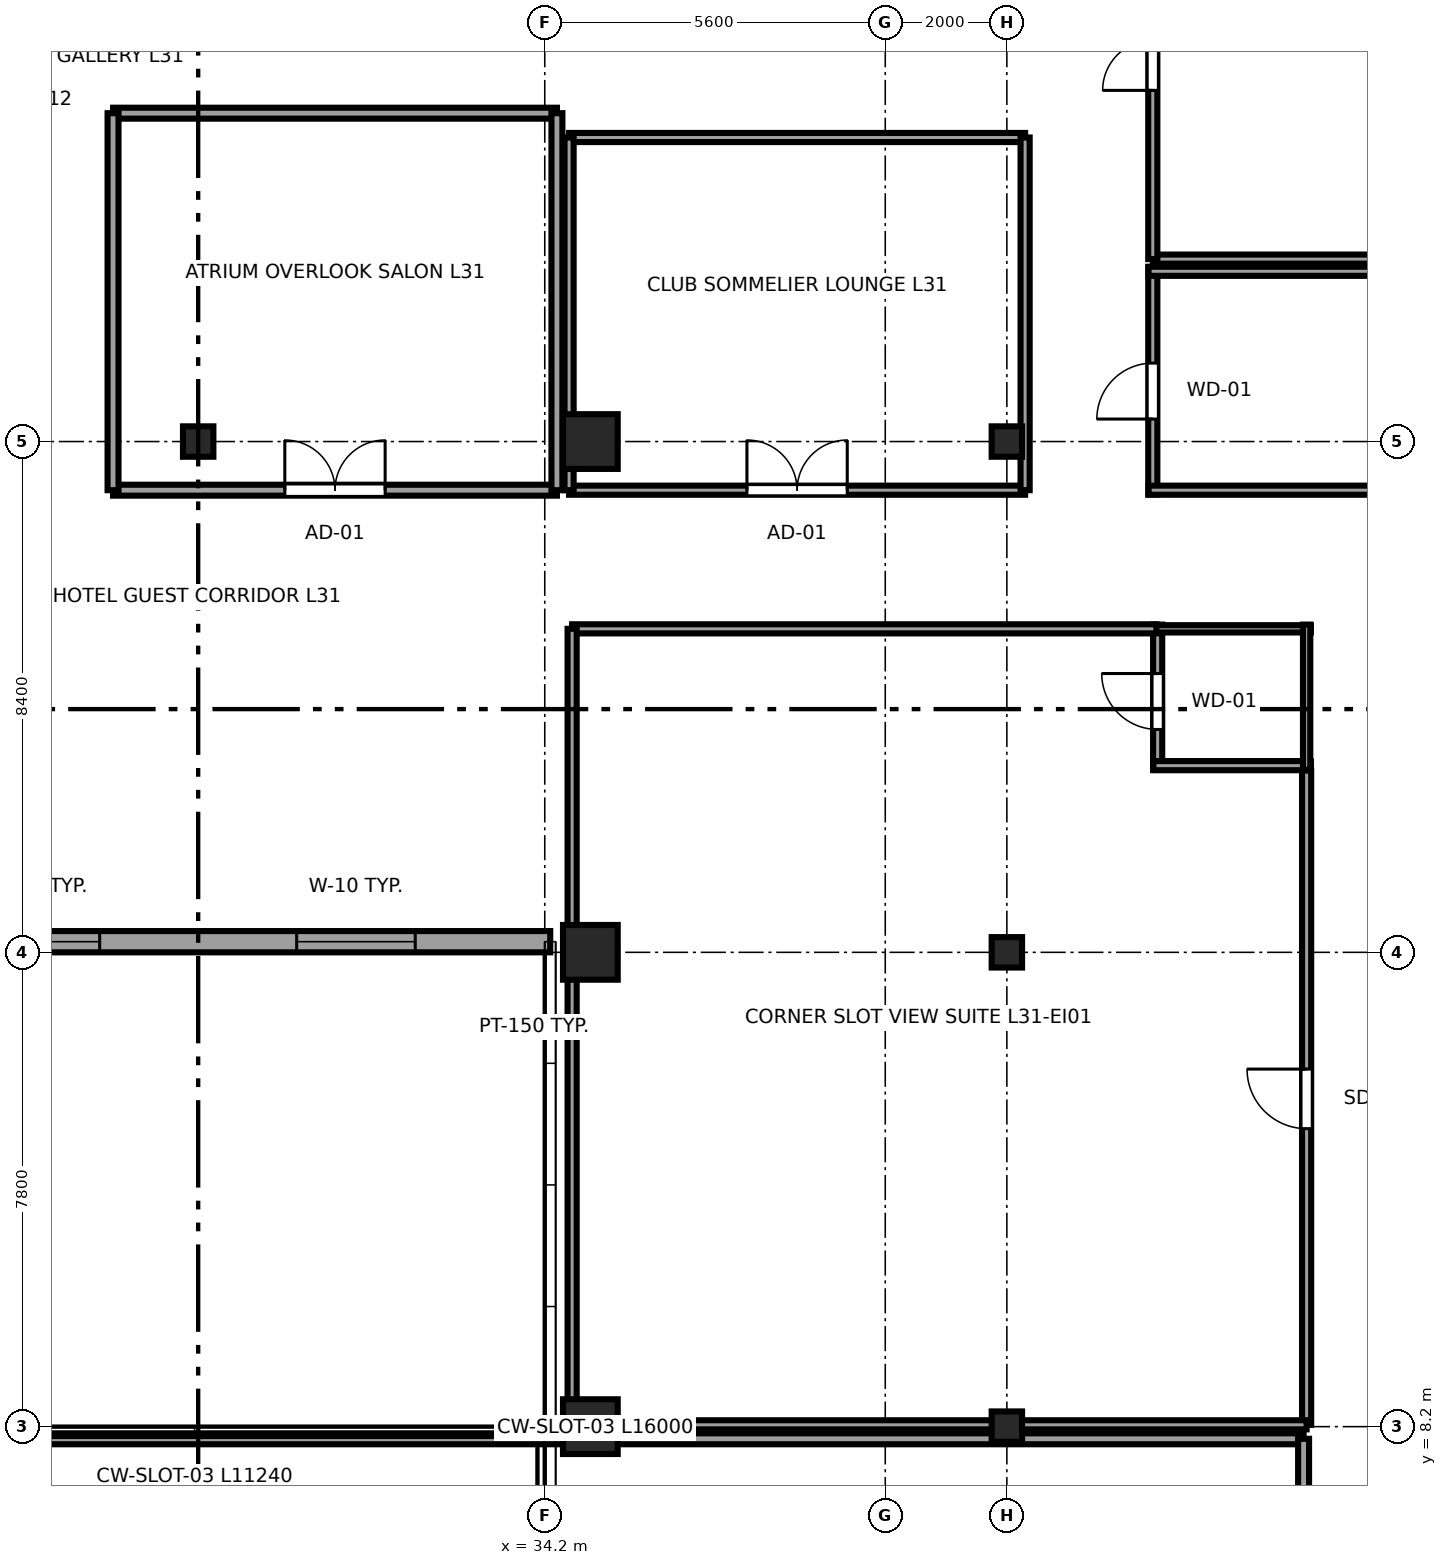
"""IFC4 building model, lengths in metres.
Left out: names, types, materials, properties, quantities, classifications, styles, units other than length and angle.
Written with IfcOpenShell. Run it as: python <this file> out.ifc"""

import sys

from ifc_helpers import new_model, si_unit, direction, frame, frame_2d, origin, origin_2d, place, context, subcontext, project, spatial, rectangle, i_section, extrude, source, transform, mapped, element, fill, save


model = new_model("IFC4")
c1 = context("Model", 3, precision=1e-05, world=origin(), true_north=direction((0.0, 1.0)))
c2 = subcontext(c1, "Body", "Model", "MODEL_VIEW")
j1 = project(units=[si_unit("LENGTHUNIT", "METRE"), si_unit("PLANEANGLEUNIT", "RADIAN")], contexts=[c1])
p1 = place(None, origin())
s1 = spatial("IfcSite", under=j1, at=p1, CompositionType="ELEMENT")
p2 = place(p1, origin())
s2 = spatial("IfcBuilding", under=s1, at=p2, CompositionType="ELEMENT")
p3 = place(p2, frame((0.0, 0.0, 122.2)))
s3 = spatial("IfcBuildingStorey", under=s2, at=p3, CompositionType="ELEMENT", Elevation=122.2)
m1 = source(origin(), c2, "Body", "SweptSolid", [
    extrude(rectangle(XDim=0.9, YDim=0.9, at=origin_2d()), origin(), (0.0, 0.0, 1.0), 3.55),
])
for number, where, z_axis, x_axis in (
    (1, (34.95, 8.2, 0.0), (0.0, 0.0, 1.0), (1.0, 0.0, 0.0)),
    (2, (34.95, 16.0, 0.0), (0.0, 0.0, 1.0), (1.0, 0.0, 0.0)),
    (3, (34.95, 24.4, 0.0), (0.0, 0.0, 1.0), (1.0, 0.0, 0.0)),
):
    element("IfcColumn", number, at=place(p3, frame(where, z_axis=z_axis, x_axis=x_axis)), inside=s3, PredefinedType="COLUMN", context=c2, shape_type="MappedRepresentation", body=[
        mapped(m1, transform((0.0, 0.0, 0.0), x_axis=(1.0, 0.0, 0.0), y_axis=(0.0, 1.0, 0.0), z_axis=(0.0, 0.0, 1.0), scale=1.0)),
    ])
m2 = source(origin(), c2, "Body", "SweptSolid", [
    extrude(i_section(OverallWidth=0.5, OverallDepth=0.5, WebThickness=0.022, FlangeThickness=0.034, at=origin_2d()), origin(), (0.0, 0.0, 1.0), 3.55),
])
for number, where, z_axis, x_axis in (
    (4, (41.8, 8.2, 0.0), (0.0, 0.0, 1.0), (1.0, 0.0, 0.0)),
    (5, (41.8, 16.0, 0.0), (0.0, 0.0, 1.0), (1.0, 0.0, 0.0)),
    (6, (41.8, 24.4, 0.0), (0.0, 0.0, 1.0), (1.0, 0.0, 0.0)),
    (7, (28.5, 24.4, 0.0), (0.0, 0.0, 1.0), (1.0, 0.0, 0.0)),
):
    element("IfcColumn", number, at=place(p3, frame(where, z_axis=z_axis, x_axis=x_axis)), inside=s3, PredefinedType="COLUMN", context=c2, shape_type="MappedRepresentation", body=[
        mapped(m2, transform((0.0, 0.0, 0.0), x_axis=(1.0, 0.0, 0.0), y_axis=(0.0, 1.0, 0.0), z_axis=(0.0, 0.0, 1.0), scale=1.0)),
    ])
p4 = place(p3, frame((22.71, 16.175, 0.0), z_axis=(0.0, 0.0, 1.0), x_axis=(1.0, 0.0, 0.0)))
e8 = element("IfcWall", 8, at=p4, inside=s3, PredefinedType="SOLIDWALL", context=c2, shape_type="SweptSolid", body=[
    extrude(rectangle(XDim=11.58, YDim=0.35, at=frame_2d((5.79, 0.0))), origin(), (0.0, 0.0, 1.0), 2.748),
])
p5 = place(p4, frame((2.22, 0.0, 0.68)))
e9 = element("IfcOpeningElement", 9, at=p5, cuts=e8, PredefinedType="OPENING", context=c2, shape_type="SweptSolid", body=[
    extrude(rectangle(XDim=1.95, YDim=1.82, at=frame_2d((0.975, 0.91))), frame((0.0, 0.185, 0.0), z_axis=(0.0, -1.0, 0.0), x_axis=(1.0, 0.0, 0.0)), (0.0, 0.0, 1.0), 0.37),
])
p6 = place(p4, frame((7.41, 0.0, 0.68)))
e10 = element("IfcOpeningElement", 10, at=p6, cuts=e8, PredefinedType="OPENING", context=c2, shape_type="SweptSolid", body=[
    extrude(rectangle(XDim=1.95, YDim=1.82, at=frame_2d((0.975, 0.91))), frame((0.0, 0.185, 0.0), z_axis=(0.0, -1.0, 0.0), x_axis=(1.0, 0.0, 0.0)), (0.0, 0.0, 1.0), 0.37),
])
p7 = place(p3, frame((44.28, 19.0, 0.0), z_axis=(0.0, 0.0, 1.0), x_axis=(0.0, 1.0, 0.0)))
e11 = element("IfcWall", 11, at=p7, inside=s3, PredefinedType="PARTITIONING", context=c2, shape_type="SweptSolid", body=[
    extrude(rectangle(XDim=2.39, YDim=0.15, at=frame_2d((1.195, 0.0))), origin(), (0.0, 0.0, 1.0), 3.37),
])
p8 = place(p7, frame((0.665, 0.0, 0.0)))
e12 = element("IfcOpeningElement", 12, at=p8, cuts=e11, PredefinedType="OPENING", context=c2, shape_type="SweptSolid", body=[
    extrude(rectangle(XDim=0.92, YDim=2.01, at=frame_2d((0.46, 1.005))), frame((0.0, 0.085, 0.0), z_axis=(0.0, -1.0, 0.0), x_axis=(1.0, 0.0, 0.0)), (0.0, 0.0, 1.0), 0.17),
])
p9 = place(p3, frame((44.21, 19.07, 0.0), z_axis=(0.0, 0.0, 1.0), x_axis=(1.0, 0.0, 0.0)))
e13 = element("IfcWall", 13, at=p9, inside=s3, PredefinedType="PARTITIONING", context=c2, shape_type="SweptSolid", body=[
    extrude(rectangle(XDim=2.59, YDim=0.15, at=frame_2d((1.295, 0.0))), origin(), (0.0, 0.0, 1.0), 3.37),
])
p10 = place(p3, frame((44.21, 21.32, 0.0), z_axis=(0.0, 0.0, 1.0), x_axis=(1.0, 0.0, 0.0)))
e14 = element("IfcWall", 14, at=p10, inside=s3, PredefinedType="PLUMBINGWALL", context=c2, shape_type="SweptSolid", body=[
    extrude(rectangle(XDim=2.59, YDim=0.12, at=frame_2d((1.295, 0.0))), origin(), (0.0, 0.0, 1.0), 3.37),
])
p11 = place(p3, frame((46.73, 19.0, 0.0), z_axis=(0.0, 0.0, 1.0), x_axis=(0.0, 1.0, 0.0)))
e15 = element("IfcWall", 15, at=p11, inside=s3, PredefinedType="PLUMBINGWALL", context=c2, shape_type="SweptSolid", body=[
    extrude(rectangle(XDim=2.39, YDim=0.12, at=frame_2d((1.195, 0.0))), origin(), (0.0, 0.0, 1.0), 3.37),
])
p12 = place(p3, frame((46.73, 8.23, 0.0), z_axis=(0.0, 0.0, 1.0), x_axis=(0.0, 1.0, 0.0)))
e16 = element("IfcWall", 16, at=p12, inside=s3, PredefinedType="PARTITIONING", context=c2, shape_type="SweptSolid", body=[
    extrude(rectangle(XDim=10.76, YDim=0.15, at=frame_2d((5.38, 0.0))), origin(), (0.0, 0.0, 1.0), 3.37),
])
p13 = place(p12, frame((4.87, 0.0, 0.0)))
e17 = element("IfcOpeningElement", 17, at=p13, cuts=e16, PredefinedType="OPENING", context=c2, shape_type="SweptSolid", body=[
    extrude(rectangle(XDim=0.98, YDim=2.12, at=frame_2d((0.49, 1.06))), frame((0.0, 0.085, 0.0), z_axis=(0.0, -1.0, 0.0), x_axis=(1.0, 0.0, 0.0)), (0.0, 0.0, 1.0), 0.17),
])
p14 = place(p3, frame((34.65, 8.23, 0.0), z_axis=(0.0, 0.0, 1.0), x_axis=(1.0, 0.0, 0.0)))
e18 = element("IfcWall", 18, at=p14, inside=s3, PredefinedType="PARTITIONING", context=c2, shape_type="SweptSolid", body=[
    extrude(rectangle(XDim=12.08, YDim=0.15, at=frame_2d((6.04, 0.0))), origin(), (0.0, 0.0, 1.0), 2.748),
])
p15 = place(p3, frame((34.65, 21.32, 0.0), z_axis=(0.0, 0.0, 1.0), x_axis=(1.0, 0.0, 0.0)))
e19 = element("IfcWall", 19, at=p15, inside=s3, PredefinedType="PARTITIONING", context=c2, shape_type="SweptSolid", body=[
    extrude(rectangle(XDim=9.61, YDim=0.15, at=frame_2d((4.805, 0.0))), origin(), (0.0, 0.0, 1.0), 3.37),
])
p16 = place(p3, frame((34.65, 8.23, 0.0), z_axis=(0.0, 0.0, 1.0), x_axis=(0.0, 1.0, 0.0)))
e20 = element("IfcWall", 20, at=p16, inside=s3, PredefinedType="PARTITIONING", context=c2, shape_type="SweptSolid", body=[
    extrude(rectangle(XDim=13.09, YDim=0.15, at=frame_2d((6.545, 0.0))), origin(), (0.0, 0.0, 1.0), 3.37),
])
p17 = place(p3, frame((44.2, 23.53, 0.0), z_axis=(0.0, 0.0, 1.0), x_axis=(0.0, 1.0, 0.0)))
e21 = element("IfcWall", 21, at=p17, inside=s3, PredefinedType="PARTITIONING", context=c2, shape_type="SweptSolid", body=[
    extrude(rectangle(XDim=3.74, YDim=0.15, at=frame_2d((1.87, 0.0))), origin(), (0.0, 0.0, 1.0), 3.37),
])
p18 = place(p17, frame((1.24, 0.0, 0.0)))
e22 = element("IfcOpeningElement", 22, at=p18, cuts=e21, PredefinedType="OPENING", context=c2, shape_type="SweptSolid", body=[
    extrude(rectangle(XDim=0.92, YDim=2.01, at=frame_2d((0.46, 1.005))), frame((0.0, 0.085, 0.0), z_axis=(0.0, -1.0, 0.0), x_axis=(1.0, 0.0, 0.0)), (0.0, 0.0, 1.0), 0.17),
])
for number, where, z_axis, x_axis in (
    (23, (44.13, 23.6, 0.0), (0.0, 0.0, 1.0), (1.0, 0.0, 0.0)),
    (24, (44.13, 27.2, 0.0), (0.0, 0.0, 1.0), (1.0, 0.0, 0.0)),
):
    element("IfcWall", number, at=place(p3, frame(where, z_axis=z_axis, x_axis=x_axis)), inside=s3, PredefinedType="PARTITIONING", context=c2, shape_type="SweptSolid", body=[
        extrude(rectangle(XDim=4.54, YDim=0.15, at=frame_2d((2.27, 0.0))), origin(), (0.0, 0.0, 1.0), 3.37),
    ])
p19 = place(p3, frame((44.2, 27.4, 0.0), z_axis=(0.0, 0.0, 1.0), x_axis=(1.0, 0.0, 0.0)))
e25 = element("IfcWall", 25, at=p19, inside=s3, PredefinedType="PARTITIONING", context=c2, shape_type="SweptSolid", body=[
    extrude(rectangle(XDim=12.5, YDim=0.15, at=frame_2d((6.25, 0.0))), origin(), (0.0, 0.0, 1.0), 3.37),
])
p20 = place(p3, frame((44.2, 27.4, 0.0), z_axis=(0.0, 0.0, 1.0), x_axis=(0.0, 1.0, 0.0)))
e26 = element("IfcWall", 26, at=p20, inside=s3, PredefinedType="PARTITIONING", context=c2, shape_type="SweptSolid", body=[
    extrude(rectangle(XDim=7.2, YDim=0.15, at=frame_2d((3.6, 0.0))), origin(), (0.0, 0.0, 1.0), 3.37),
])
p21 = place(p20, frame((2.775, 0.0, 0.0)))
e27 = element("IfcOpeningElement", 27, at=p21, cuts=e26, PredefinedType="OPENING", context=c2, shape_type="SweptSolid", body=[
    extrude(rectangle(XDim=1.65, YDim=2.15, at=frame_2d((0.825, 1.075))), frame((0.0, 0.085, 0.0), z_axis=(0.0, -1.0, 0.0), x_axis=(1.0, 0.0, 0.0)), (0.0, 0.0, 1.0), 0.17),
])
p22 = place(p3, frame((27.1, 23.6, 0.0), z_axis=(0.0, 0.0, 1.0), x_axis=(1.0, 0.0, 0.0)))
e28 = element("IfcWall", 28, at=p22, inside=s3, PredefinedType="PARTITIONING", context=c2, shape_type="SweptSolid", body=[
    extrude(rectangle(XDim=7.3, YDim=0.18, at=frame_2d((3.65, 0.0))), origin(), (0.0, 0.0, 1.0), 3.37),
])
p23 = place(p22, frame((2.825, 0.0, 0.0)))
e29 = element("IfcOpeningElement", 29, at=p23, cuts=e28, PredefinedType="OPENING", context=c2, shape_type="SweptSolid", body=[
    extrude(rectangle(XDim=1.65, YDim=2.15, at=frame_2d((0.825, 1.075))), frame((0.0, 0.1, 0.0), z_axis=(0.0, -1.0, 0.0), x_axis=(1.0, 0.0, 0.0)), (0.0, 0.0, 1.0), 0.2),
])
p24 = place(p3, frame((27.1, 29.8, 0.0), z_axis=(0.0, 0.0, 1.0), x_axis=(1.0, 0.0, 0.0)))
e30 = element("IfcWall", 30, at=p24, inside=s3, PredefinedType="PARTITIONING", context=c2, shape_type="SweptSolid", body=[
    extrude(rectangle(XDim=7.3, YDim=0.18, at=frame_2d((3.65, 0.0))), origin(), (0.0, 0.0, 1.0), 3.37),
])
for number, where, z_axis, x_axis in (
    (31, (27.1, 23.6, 0.0), (0.0, 0.0, 1.0), (0.0, 1.0, 0.0)),
    (32, (34.4, 23.6, 0.0), (0.0, 0.0, 1.0), (0.0, 1.0, 0.0)),
):
    element("IfcWall", number, at=place(p3, frame(where, z_axis=z_axis, x_axis=x_axis)), inside=s3, PredefinedType="PARTITIONING", context=c2, shape_type="SweptSolid", body=[
        extrude(rectangle(XDim=6.2, YDim=0.18, at=frame_2d((3.1, 0.0))), origin(), (0.0, 0.0, 1.0), 3.37),
    ])
p25 = place(p3, frame((34.6, 23.6, 0.0), z_axis=(0.0, 0.0, 1.0), x_axis=(1.0, 0.0, 0.0)))
e33 = element("IfcWall", 33, at=p25, inside=s3, PredefinedType="PARTITIONING", context=c2, shape_type="SweptSolid", body=[
    extrude(rectangle(XDim=7.5, YDim=0.15, at=frame_2d((3.75, 0.0))), origin(), (0.0, 0.0, 1.0), 3.37),
])
p26 = place(p25, frame((2.925, 0.0, 0.0)))
e34 = element("IfcOpeningElement", 34, at=p26, cuts=e33, PredefinedType="OPENING", context=c2, shape_type="SweptSolid", body=[
    extrude(rectangle(XDim=1.65, YDim=2.15, at=frame_2d((0.825, 1.075))), frame((0.0, 0.085, 0.0), z_axis=(0.0, -1.0, 0.0), x_axis=(1.0, 0.0, 0.0)), (0.0, 0.0, 1.0), 0.17),
])
p27 = place(p3, frame((34.6, 29.4, 0.0), z_axis=(0.0, 0.0, 1.0), x_axis=(1.0, 0.0, 0.0)))
e35 = element("IfcWall", 35, at=p27, inside=s3, PredefinedType="PARTITIONING", context=c2, shape_type="SweptSolid", body=[
    extrude(rectangle(XDim=7.5, YDim=0.15, at=frame_2d((3.75, 0.0))), origin(), (0.0, 0.0, 1.0), 3.37),
])
p28 = place(p3, frame((34.6, 23.6, 0.0), z_axis=(0.0, 0.0, 1.0), x_axis=(0.0, 1.0, 0.0)))
e36 = element("IfcWall", 36, at=p28, inside=s3, PredefinedType="PARTITIONING", context=c2, shape_type="SweptSolid", body=[
    extrude(rectangle(XDim=5.8, YDim=0.15, at=frame_2d((2.9, 0.0))), origin(), (0.0, 0.0, 1.0), 3.37),
])
p29 = place(p3, frame((42.1, 23.6, 0.0), z_axis=(0.0, 0.0, 1.0), x_axis=(0.0, 1.0, 0.0)))
e37 = element("IfcWall", 37, at=p29, inside=s3, PredefinedType="PARTITIONING", context=c2, shape_type="SweptSolid", body=[
    extrude(rectangle(XDim=5.8, YDim=0.15, at=frame_2d((2.9, 0.0))), origin(), (0.0, 0.0, 1.0), 2.16),
])
p30 = place(p3, frame((11.57, 8.0, 0.0), z_axis=(0.0, 0.0, 1.0), x_axis=(1.0, 0.0, 0.0)))
e38 = element("IfcWall", 38, at=p30, inside=s3, PredefinedType="PARTITIONING", context=c2, shape_type="SweptSolid", body=[
    extrude(rectangle(XDim=35.11, YDim=0.18, at=frame_2d((17.555, 0.0))), origin(), (0.0, 0.0, 1.0), 3.37),
])
p31 = place(p3, frame((46.68, 2.6, 0.0), z_axis=(0.0, 0.0, 1.0), x_axis=(0.0, 1.0, 0.0)))
e39 = element("IfcWall", 39, at=p31, inside=s3, PredefinedType="PARTITIONING", context=c2, shape_type="SweptSolid", body=[
    extrude(rectangle(XDim=5.4, YDim=0.18, at=frame_2d((2.7, 0.0))), origin(), (0.0, 0.0, 1.0), 3.37),
])
m3 = source(origin(), c2, "Body", "SweptSolid", [
    extrude(rectangle(XDim=1.95, YDim=1.82, at=frame_2d((0.975, 0.91))), frame((0.0, 0.09, 0.0), z_axis=(0.0, -1.0, 0.0), x_axis=(1.0, 0.0, 0.0)), (0.0, 0.0, 1.0), 0.06),
])
p32 = place(p5, origin())
e40 = element("IfcWindow", 40, at=p32, inside=s3, PartitioningType="DOUBLE_PANEL_VERTICAL", PredefinedType="WINDOW", context=c2, shape_type="MappedRepresentation", body=[
    mapped(m3, transform((0.0, 0.0, 0.0), x_axis=(1.0, 0.0, 0.0), y_axis=(0.0, 1.0, 0.0), z_axis=(0.0, 0.0, 1.0), scale=1.0)),
])
fill(e9, e40)
p33 = place(p6, origin())
e41 = element("IfcWindow", 41, at=p33, inside=s3, PartitioningType="DOUBLE_PANEL_VERTICAL", PredefinedType="WINDOW", context=c2, shape_type="MappedRepresentation", body=[
    mapped(m3, transform((0.0, 0.0, 0.0), x_axis=(1.0, 0.0, 0.0), y_axis=(0.0, 1.0, 0.0), z_axis=(0.0, 0.0, 1.0), scale=1.0)),
])
fill(e10, e41)
m4 = source(origin(), c2, "Body", "SweptSolid", [
    extrude(rectangle(XDim=0.92, YDim=2.01, at=frame_2d((0.46, 1.005))), frame((0.0, 0.025, 0.0), z_axis=(0.0, -1.0, 0.0), x_axis=(1.0, 0.0, 0.0)), (0.0, 0.0, 1.0), 0.05),
])
p34 = place(p8, origin())
e42 = element("IfcDoor", 42, at=p34, inside=s3, OperationType="SINGLE_SWING_RIGHT", PredefinedType="DOOR", context=c2, shape_type="MappedRepresentation", body=[
    mapped(m4, transform((0.0, 0.0, 0.0), x_axis=(1.0, 0.0, 0.0), y_axis=(0.0, 1.0, 0.0), z_axis=(0.0, 0.0, 1.0), scale=1.0)),
])
fill(e12, e42)
m5 = source(origin(), c2, "Body", "SweptSolid", [
    extrude(rectangle(XDim=0.98, YDim=2.12, at=frame_2d((0.49, 1.06))), frame((0.0, 0.025, 0.0), z_axis=(0.0, -1.0, 0.0), x_axis=(1.0, 0.0, 0.0)), (0.0, 0.0, 1.0), 0.05),
])
p35 = place(p13, origin())
e43 = element("IfcDoor", 43, at=p35, inside=s3, OperationType="SINGLE_SWING_RIGHT", PredefinedType="DOOR", context=c2, shape_type="MappedRepresentation", body=[
    mapped(m5, transform((0.0, 0.0, 0.0), x_axis=(1.0, 0.0, 0.0), y_axis=(0.0, 1.0, 0.0), z_axis=(0.0, 0.0, 1.0), scale=1.0)),
])
fill(e17, e43)
p36 = place(p18, origin())
e44 = element("IfcDoor", 44, at=p36, inside=s3, OperationType="SINGLE_SWING_LEFT", PredefinedType="DOOR", context=c2, shape_type="MappedRepresentation", body=[
    mapped(m4, transform((0.0, 0.0, 0.0), x_axis=(1.0, 0.0, 0.0), y_axis=(0.0, 1.0, 0.0), z_axis=(0.0, 0.0, 1.0), scale=1.0)),
])
fill(e22, e44)
m6 = source(origin(), c2, "Body", "SweptSolid", [
    extrude(rectangle(XDim=1.65, YDim=2.15, at=frame_2d((0.825, 1.075))), frame((0.0, 0.025, 0.0), z_axis=(0.0, -1.0, 0.0), x_axis=(1.0, 0.0, 0.0)), (0.0, 0.0, 1.0), 0.05),
])
p37 = place(p21, origin())
e45 = element("IfcDoor", 45, at=p37, inside=s3, OperationType="DOUBLE_DOOR_SINGLE_SWING", PredefinedType="DOOR", context=c2, shape_type="MappedRepresentation", body=[
    mapped(m6, transform((0.0, 0.0, 0.0), x_axis=(1.0, 0.0, 0.0), y_axis=(0.0, 1.0, 0.0), z_axis=(0.0, 0.0, 1.0), scale=1.0)),
])
fill(e27, e45)
p38 = place(p23, origin())
e46 = element("IfcDoor", 46, at=p38, inside=s3, OperationType="DOUBLE_DOOR_SINGLE_SWING", PredefinedType="DOOR", context=c2, shape_type="MappedRepresentation", body=[
    mapped(m6, transform((0.0, 0.0, 0.0), x_axis=(1.0, 0.0, 0.0), y_axis=(0.0, 1.0, 0.0), z_axis=(0.0, 0.0, 1.0), scale=1.0)),
])
fill(e29, e46)
p39 = place(p26, origin())
e47 = element("IfcDoor", 47, at=p39, inside=s3, OperationType="DOUBLE_DOOR_SINGLE_SWING", PredefinedType="DOOR", context=c2, shape_type="MappedRepresentation", body=[
    mapped(m6, transform((0.0, 0.0, 0.0), x_axis=(1.0, 0.0, 0.0), y_axis=(0.0, 1.0, 0.0), z_axis=(0.0, 0.0, 1.0), scale=1.0)),
])
fill(e34, e47)
save(model, sys.argv[1])
